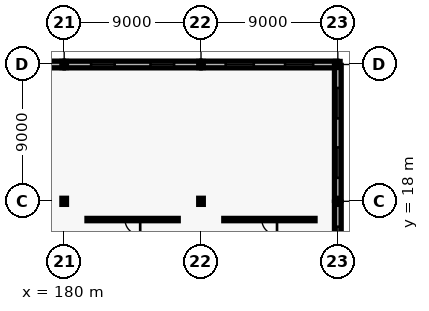
"""IFC4 building model, lengths in metres.
Left out: names, types, materials, properties, quantities, classifications, styles, units other than length and angle.
Written with IfcOpenShell. Run it as: python <this file> out.ifc"""

import sys

from ifc_helpers import new_model, si_unit, direction, frame, frame_2d, origin, origin_2d, place, context, subcontext, project, spatial, rectangle, i_section, extrude, element, fill, save


model = new_model("IFC4")
c1 = context("Model", 3, precision=1e-05, world=origin(), true_north=direction((0.0, 1.0)))
c2 = subcontext(c1, "Body", "Model", "MODEL_VIEW")
j1 = project(units=[si_unit("LENGTHUNIT", "METRE"), si_unit("PLANEANGLEUNIT", "RADIAN")], contexts=[c1])
p1 = place(None, origin())
s1 = spatial("IfcSite", under=j1, at=p1, CompositionType="ELEMENT")
p2 = place(p1, origin())
s2 = spatial("IfcBuilding", under=s1, at=p2, CompositionType="ELEMENT")
p3 = place(p2, frame((0.0, 0.0, 5.4)))
s3 = spatial("IfcBuildingStorey", under=s2, at=p3, CompositionType="ELEMENT", Elevation=5.4)
for number, where, z_axis, x_axis in (
    (1, (180.0, 18.0, 0.0), (0.0, 0.0, 1.0), (1.0, 0.0, 0.0)),
    (2, (180.0, 27.0, 0.0), (0.0, 0.0, 1.0), (1.0, 0.0, 0.0)),
    (3, (189.0, 18.0, 0.0), (0.0, 0.0, 1.0), (1.0, 0.0, 0.0)),
    (4, (189.0, 27.0, 0.0), (0.0, 0.0, 1.0), (1.0, 0.0, 0.0)),
    (5, (198.0, 18.0, 0.0), (0.0, 0.0, 1.0), (1.0, 0.0, 0.0)),
    (6, (198.0, 27.0, 0.0), (0.0, 0.0, 1.0), (1.0, 0.0, 0.0)),
):
    element("IfcColumn", number, at=place(p3, frame(where, z_axis=z_axis, x_axis=x_axis)), inside=s3, PredefinedType="COLUMN", context=c2, shape_type="SweptSolid", body=[
        extrude(i_section(OverallWidth=0.3, OverallDepth=0.4, WebThickness=0.013, FlangeThickness=0.024, FilletRadius=0.027, at=origin_2d()), origin(), (0.0, 0.0, 1.0), 4.2),
    ])
p4 = place(p3, frame((171.06, 27.0, 0.0), z_axis=(0.0, 0.0, 1.0), x_axis=(1.0, 0.0, 0.0)))
e7 = element("IfcWall", 7, at=p4, inside=s3, PredefinedType="SOLIDWALL", context=c2, shape_type="SweptSolid", body=[
    extrude(rectangle(XDim=8.88, YDim=0.44, at=frame_2d((4.44, 0.0))), origin(), (0.0, 0.0, 1.0), 3.5),
])
p5 = place(p4, frame((1.286, 0.0, 0.9)))
e8 = element("IfcOpeningElement", 8, at=p5, cuts=e7, PredefinedType="OPENING", context=c2, shape_type="SweptSolid", body=[
    extrude(rectangle(XDim=2.4, YDim=2.1, at=frame_2d((1.2, 1.05))), frame((0.0, 0.23, 0.0), z_axis=(0.0, -1.0, 0.0), x_axis=(1.0, 0.0, 0.0)), (0.0, 0.0, 1.0), 0.46),
])
p6 = place(p4, frame((5.194, 0.0, 0.9)))
e9 = element("IfcOpeningElement", 9, at=p6, cuts=e7, PredefinedType="OPENING", context=c2, shape_type="SweptSolid", body=[
    extrude(rectangle(XDim=2.4, YDim=2.1, at=frame_2d((1.2, 1.05))), frame((0.0, 0.23, 0.0), z_axis=(0.0, -1.0, 0.0), x_axis=(1.0, 0.0, 0.0)), (0.0, 0.0, 1.0), 0.46),
])
p7 = place(p3, frame((180.06, 27.0, 0.0), z_axis=(0.0, 0.0, 1.0), x_axis=(1.0, 0.0, 0.0)))
e10 = element("IfcWall", 10, at=p7, inside=s3, PredefinedType="SOLIDWALL", context=c2, shape_type="SweptSolid", body=[
    extrude(rectangle(XDim=8.88, YDim=0.44, at=frame_2d((4.44, 0.0))), origin(), (0.0, 0.0, 1.0), 3.5),
])
p8 = place(p7, frame((1.711, 0.0, 0.9)))
e11 = element("IfcOpeningElement", 11, at=p8, cuts=e10, PredefinedType="OPENING", context=c2, shape_type="SweptSolid", body=[
    extrude(rectangle(XDim=1.55, YDim=1.95, at=frame_2d((0.775, 0.975))), frame((0.0, 0.23, 0.0), z_axis=(0.0, -1.0, 0.0), x_axis=(1.0, 0.0, 0.0)), (0.0, 0.0, 1.0), 0.46),
])
p9 = place(p7, frame((5.619, 0.0, 0.9)))
e12 = element("IfcOpeningElement", 12, at=p9, cuts=e10, PredefinedType="OPENING", context=c2, shape_type="SweptSolid", body=[
    extrude(rectangle(XDim=1.55, YDim=1.95, at=frame_2d((0.775, 0.975))), frame((0.0, 0.23, 0.0), z_axis=(0.0, -1.0, 0.0), x_axis=(1.0, 0.0, 0.0)), (0.0, 0.0, 1.0), 0.46),
])
p10 = place(p3, frame((189.06, 27.0, 0.0), z_axis=(0.0, 0.0, 1.0), x_axis=(1.0, 0.0, 0.0)))
e13 = element("IfcWall", 13, at=p10, inside=s3, PredefinedType="SOLIDWALL", context=c2, shape_type="SweptSolid", body=[
    extrude(rectangle(XDim=8.88, YDim=0.44, at=frame_2d((4.44, 0.0))), origin(), (0.0, 0.0, 1.0), 3.5),
])
p11 = place(p10, frame((1.561, 0.0, 0.9)))
e14 = element("IfcOpeningElement", 14, at=p11, cuts=e13, PredefinedType="OPENING", context=c2, shape_type="SweptSolid", body=[
    extrude(rectangle(XDim=1.85, YDim=2.05, at=frame_2d((0.925, 1.025))), frame((0.0, 0.23, 0.0), z_axis=(0.0, -1.0, 0.0), x_axis=(1.0, 0.0, 0.0)), (0.0, 0.0, 1.0), 0.46),
])
p12 = place(p10, frame((5.469, 0.0, 0.9)))
e15 = element("IfcOpeningElement", 15, at=p12, cuts=e13, PredefinedType="OPENING", context=c2, shape_type="SweptSolid", body=[
    extrude(rectangle(XDim=1.85, YDim=2.05, at=frame_2d((0.925, 1.025))), frame((0.0, 0.23, 0.0), z_axis=(0.0, -1.0, 0.0), x_axis=(1.0, 0.0, 0.0)), (0.0, 0.0, 1.0), 0.46),
])
p13 = place(p3, frame((198.0, 9.06, 0.0), z_axis=(0.0, 0.0, 1.0), x_axis=(0.0, 1.0, 0.0)))
e16 = element("IfcWall", 16, at=p13, inside=s3, PredefinedType="SOLIDWALL", context=c2, shape_type="SweptSolid", body=[
    extrude(rectangle(XDim=8.88, YDim=0.44, at=frame_2d((4.44, 0.0))), origin(), (0.0, 0.0, 1.0), 3.5),
])
p14 = place(p13, frame((1.611, 0.0, 0.9)))
e17 = element("IfcOpeningElement", 17, at=p14, cuts=e16, PredefinedType="OPENING", context=c2, shape_type="SweptSolid", body=[
    extrude(rectangle(XDim=1.75, YDim=2.25, at=frame_2d((0.875, 1.125))), frame((0.0, 0.23, 0.0), z_axis=(0.0, -1.0, 0.0), x_axis=(1.0, 0.0, 0.0)), (0.0, 0.0, 1.0), 0.46),
])
p15 = place(p13, frame((5.519, 0.0, 0.9)))
e18 = element("IfcOpeningElement", 18, at=p15, cuts=e16, PredefinedType="OPENING", context=c2, shape_type="SweptSolid", body=[
    extrude(rectangle(XDim=1.75, YDim=2.25, at=frame_2d((0.875, 1.125))), frame((0.0, 0.23, 0.0), z_axis=(0.0, -1.0, 0.0), x_axis=(1.0, 0.0, 0.0)), (0.0, 0.0, 1.0), 0.46),
])
p16 = place(p3, frame((198.0, 18.06, 0.0), z_axis=(0.0, 0.0, 1.0), x_axis=(0.0, 1.0, 0.0)))
e19 = element("IfcWall", 19, at=p16, inside=s3, PredefinedType="SOLIDWALL", context=c2, shape_type="SweptSolid", body=[
    extrude(rectangle(XDim=8.88, YDim=0.44, at=frame_2d((4.44, 0.0))), origin(), (0.0, 0.0, 1.0), 3.5),
])
p17 = place(p16, frame((1.486, 0.0, 0.9)))
e20 = element("IfcOpeningElement", 20, at=p17, cuts=e19, PredefinedType="OPENING", context=c2, shape_type="SweptSolid", body=[
    extrude(rectangle(XDim=2.0, YDim=2.4, at=frame_2d((1.0, 1.2))), frame((0.0, 0.23, 0.0), z_axis=(0.0, -1.0, 0.0), x_axis=(1.0, 0.0, 0.0)), (0.0, 0.0, 1.0), 0.46),
])
p18 = place(p16, frame((5.394, 0.0, 0.9)))
e21 = element("IfcOpeningElement", 21, at=p18, cuts=e19, PredefinedType="OPENING", context=c2, shape_type="SweptSolid", body=[
    extrude(rectangle(XDim=2.0, YDim=2.4, at=frame_2d((1.0, 1.2))), frame((0.0, 0.23, 0.0), z_axis=(0.0, -1.0, 0.0), x_axis=(1.0, 0.0, 0.0)), (0.0, 0.0, 1.0), 0.46),
])
p19 = place(p3, frame((181.5, 16.8, 0.0), z_axis=(0.0, 0.0, 1.0), x_axis=(1.0, 0.0, 0.0)))
e22 = element("IfcWall", 22, at=p19, inside=s3, PredefinedType="PARTITIONING", context=c2, shape_type="SweptSolid", body=[
    extrude(rectangle(XDim=6.0, YDim=0.15, at=frame_2d((3.0, 0.0))), origin(), (0.0, 0.0, 1.0), 3.2),
])
p20 = place(p19, frame((2.5, 0.0, 0.0)))
e23 = element("IfcOpeningElement", 23, at=p20, cuts=e22, PredefinedType="OPENING", context=c2, shape_type="SweptSolid", body=[
    extrude(rectangle(XDim=1.0, YDim=2.1, at=frame_2d((0.5, 1.05))), frame((0.0, 0.085, 0.0), z_axis=(0.0, -1.0, 0.0), x_axis=(1.0, 0.0, 0.0)), (0.0, 0.0, 1.0), 0.17),
])
p21 = place(p3, frame((190.5, 16.8, 0.0), z_axis=(0.0, 0.0, 1.0), x_axis=(1.0, 0.0, 0.0)))
e24 = element("IfcWall", 24, at=p21, inside=s3, PredefinedType="PARTITIONING", context=c2, shape_type="SweptSolid", body=[
    extrude(rectangle(XDim=6.0, YDim=0.15, at=frame_2d((3.0, 0.0))), origin(), (0.0, 0.0, 1.0), 3.2),
])
p22 = place(p21, frame((2.5, 0.0, 0.0)))
e25 = element("IfcOpeningElement", 25, at=p22, cuts=e24, PredefinedType="OPENING", context=c2, shape_type="SweptSolid", body=[
    extrude(rectangle(XDim=1.0, YDim=2.1, at=frame_2d((0.5, 1.05))), frame((0.0, 0.085, 0.0), z_axis=(0.0, -1.0, 0.0), x_axis=(1.0, 0.0, 0.0)), (0.0, 0.0, 1.0), 0.17),
])
p23 = place(p8, origin())
e26 = element("IfcWindow", 26, at=p23, inside=s3, PartitioningType="SINGLE_PANEL", PredefinedType="WINDOW", context=c2, shape_type="SweptSolid", body=[
    extrude(rectangle(XDim=1.55, YDim=1.95, at=frame_2d((0.775, 0.975))), frame((0.0, 0.03, 0.0), z_axis=(0.0, -1.0, 0.0), x_axis=(1.0, 0.0, 0.0)), (0.0, 0.0, 1.0), 0.06),
])
fill(e11, e26)
p24 = place(p9, origin())
e27 = element("IfcWindow", 27, at=p24, inside=s3, PartitioningType="SINGLE_PANEL", PredefinedType="WINDOW", context=c2, shape_type="SweptSolid", body=[
    extrude(rectangle(XDim=1.55, YDim=1.95, at=frame_2d((0.775, 0.975))), frame((0.0, 0.03, 0.0), z_axis=(0.0, -1.0, 0.0), x_axis=(1.0, 0.0, 0.0)), (0.0, 0.0, 1.0), 0.06),
])
fill(e12, e27)
p25 = place(p11, origin())
e28 = element("IfcWindow", 28, at=p25, inside=s3, PartitioningType="SINGLE_PANEL", PredefinedType="WINDOW", context=c2, shape_type="SweptSolid", body=[
    extrude(rectangle(XDim=1.85, YDim=2.05, at=frame_2d((0.925, 1.025))), frame((0.0, 0.03, 0.0), z_axis=(0.0, -1.0, 0.0), x_axis=(1.0, 0.0, 0.0)), (0.0, 0.0, 1.0), 0.06),
])
fill(e14, e28)
p26 = place(p12, origin())
e29 = element("IfcWindow", 29, at=p26, inside=s3, PartitioningType="SINGLE_PANEL", PredefinedType="WINDOW", context=c2, shape_type="SweptSolid", body=[
    extrude(rectangle(XDim=1.85, YDim=2.05, at=frame_2d((0.925, 1.025))), frame((0.0, 0.03, 0.0), z_axis=(0.0, -1.0, 0.0), x_axis=(1.0, 0.0, 0.0)), (0.0, 0.0, 1.0), 0.06),
])
fill(e15, e29)
p27 = place(p15, origin())
e30 = element("IfcWindow", 30, at=p27, inside=s3, PartitioningType="SINGLE_PANEL", PredefinedType="WINDOW", context=c2, shape_type="SweptSolid", body=[
    extrude(rectangle(XDim=1.75, YDim=2.25, at=frame_2d((0.875, 1.125))), frame((0.0, 0.03, 0.0), z_axis=(0.0, -1.0, 0.0), x_axis=(1.0, 0.0, 0.0)), (0.0, 0.0, 1.0), 0.06),
])
fill(e18, e30)
p28 = place(p17, origin())
e31 = element("IfcWindow", 31, at=p28, inside=s3, PartitioningType="SINGLE_PANEL", PredefinedType="WINDOW", context=c2, shape_type="SweptSolid", body=[
    extrude(rectangle(XDim=2.0, YDim=2.4, at=frame_2d((1.0, 1.2))), frame((0.0, 0.03, 0.0), z_axis=(0.0, -1.0, 0.0), x_axis=(1.0, 0.0, 0.0)), (0.0, 0.0, 1.0), 0.06),
])
fill(e20, e31)
p29 = place(p18, origin())
e32 = element("IfcWindow", 32, at=p29, inside=s3, PartitioningType="SINGLE_PANEL", PredefinedType="WINDOW", context=c2, shape_type="SweptSolid", body=[
    extrude(rectangle(XDim=2.0, YDim=2.4, at=frame_2d((1.0, 1.2))), frame((0.0, 0.03, 0.0), z_axis=(0.0, -1.0, 0.0), x_axis=(1.0, 0.0, 0.0)), (0.0, 0.0, 1.0), 0.06),
])
fill(e21, e32)
p30 = place(p20, origin())
e33 = element("IfcDoor", 33, at=p30, inside=s3, OperationType="SINGLE_SWING_RIGHT", PredefinedType="DOOR", context=c2, shape_type="SweptSolid", body=[
    extrude(rectangle(XDim=1.0, YDim=2.1, at=frame_2d((0.5, 1.05))), frame((0.0, 0.025, 0.0), z_axis=(0.0, -1.0, 0.0), x_axis=(1.0, 0.0, 0.0)), (0.0, 0.0, 1.0), 0.05),
])
fill(e23, e33)
p31 = place(p22, origin())
e34 = element("IfcDoor", 34, at=p31, inside=s3, OperationType="SINGLE_SWING_RIGHT", PredefinedType="DOOR", context=c2, shape_type="SweptSolid", body=[
    extrude(rectangle(XDim=1.0, YDim=2.1, at=frame_2d((0.5, 1.05))), frame((0.0, 0.025, 0.0), z_axis=(0.0, -1.0, 0.0), x_axis=(1.0, 0.0, 0.0)), (0.0, 0.0, 1.0), 0.05),
])
fill(e25, e34)
save(model, sys.argv[1])
